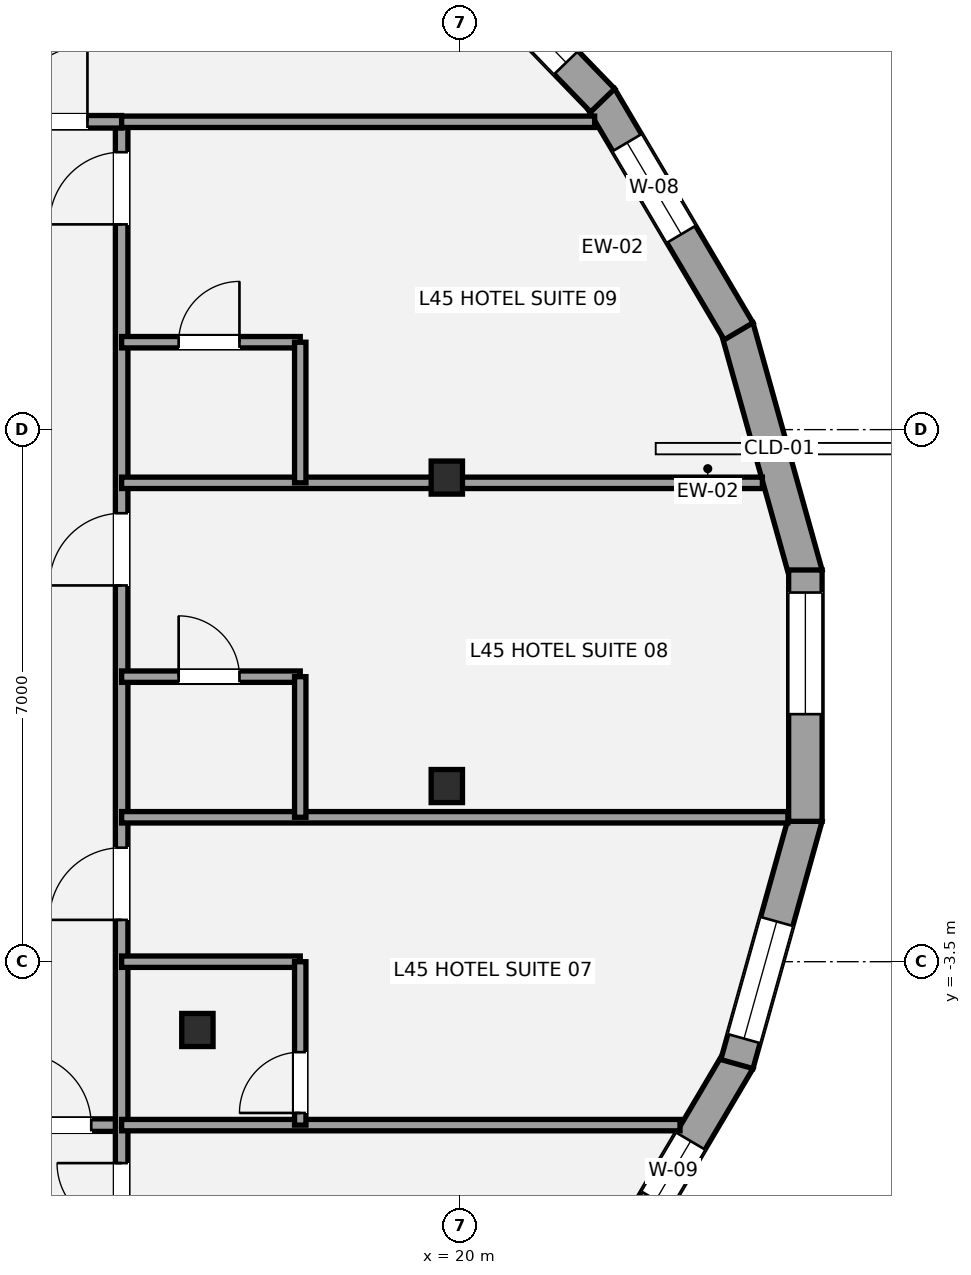
"""IFC4 building model, lengths in metres.
Left out: names, types, materials, properties, quantities, classifications, styles, units other than length and angle.
Written with IfcOpenShell. Run it as: python <this file> out.ifc"""

import sys

from ifc_helpers import new_model, si_unit, direction, frame, frame_2d, origin, origin_2d, place, context, subcontext, project, spatial, rectangle, i_section, extrude, element, fill, save


model = new_model("IFC4")
c1 = context("Model", 3, precision=1e-05, world=origin(), true_north=direction((0.0, 1.0)))
c2 = subcontext(c1, "Body", "Model", "MODEL_VIEW")
j1 = project(units=[si_unit("LENGTHUNIT", "METRE"), si_unit("PLANEANGLEUNIT", "RADIAN")], contexts=[c1])
p1 = place(None, origin())
s1 = spatial("IfcSite", under=j1, at=p1, CompositionType="ELEMENT")
p2 = place(p1, origin())
s2 = spatial("IfcBuilding", under=s1, at=p2, CompositionType="ELEMENT")
p3 = place(p2, frame((0.0, 0.0, 166.2)))
s3 = spatial("IfcBuildingStorey", under=s2, at=p3, CompositionType="ELEMENT", Elevation=166.2)
for number, where, z_axis, x_axis in (
    (1, (19.828, 2.869, 0.0), (0.0, 0.0, 1.0), (1.0, 0.0, 0.0)),
    (2, (16.547, -4.398, 0.0), (0.0, 0.0, 1.0), (1.0, 0.0, 0.0)),
    (3, (19.828, -1.189, 0.0), (0.0, 0.0, 1.0), (1.0, 0.0, 0.0)),
):
    element("IfcColumn", number, at=place(p3, frame(where, z_axis=z_axis, x_axis=x_axis)), inside=s3, PredefinedType="COLUMN", context=c2, shape_type="SweptSolid", body=[
        extrude(i_section(OverallWidth=0.412, OverallDepth=0.435, WebThickness=0.036, FlangeThickness=0.057, at=origin_2d()), origin(), (0.0, 0.0, 1.0), 3.2),
    ])
p4 = place(p3, frame((23.645, 4.846, 0.0), z_axis=(0.0, 0.0, 1.0), x_axis=(0.269235699479, -0.963074315993, 0.0)))
e4 = element("IfcWall", 4, at=p4, inside=s3, PredefinedType="STANDARD", context=c2, shape_type="SweptSolid", body=[
    extrude(rectangle(XDim=3.377, YDim=0.44, at=frame_2d((1.688, 0.0))), origin(), (0.0, 0.0, 1.0), 2.315),
])
p5 = place(p3, frame((21.847, 7.873, 0.0), z_axis=(0.0, 0.0, 1.0), x_axis=(0.508883387051, -0.860835465338, 0.0)))
e5 = element("IfcWall", 5, at=p5, inside=s3, PredefinedType="STANDARD", context=c2, shape_type="SweptSolid", body=[
    extrude(rectangle(XDim=3.577, YDim=0.44, at=frame_2d((1.788, 0.0))), origin(), (0.0, 0.0, 1.0), 2.315),
])
p6 = place(p5, frame((0.694, 0.0, 0.58)))
e6 = element("IfcOpeningElement", 6, at=p6, cuts=e5, PredefinedType="OPENING", context=c2, shape_type="SweptSolid", body=[
    extrude(rectangle(XDim=1.4, YDim=1.55, at=frame_2d((0.7, 0.775))), frame((0.0, 0.23, 0.0), z_axis=(0.0, -1.0, 0.0), x_axis=(1.0, 0.0, 0.0)), (0.0, 0.0, 1.0), 0.46),
])
p7 = place(p3, frame((19.192, 10.612, 0.0), z_axis=(0.0, 0.0, 1.0), x_axis=(0.694975307772, -0.719033602544, 0.0)))
e7 = element("IfcWall", 7, at=p7, inside=s3, PredefinedType="STANDARD", context=c2, shape_type="SweptSolid", body=[
    extrude(rectangle(XDim=3.866, YDim=0.44, at=frame_2d((1.933, 0.0))), origin(), (0.0, 0.0, 1.0), 2.315),
])
p8 = place(p7, frame((1.575, 0.0, 0.58)))
e8 = element("IfcOpeningElement", 8, at=p8, cuts=e7, PredefinedType="OPENING", context=c2, shape_type="SweptSolid", body=[
    extrude(rectangle(XDim=1.6, YDim=1.55, at=frame_2d((0.8, 0.775))), frame((0.0, 0.23, 0.0), z_axis=(0.0, -1.0, 0.0), x_axis=(1.0, 0.0, 0.0)), (0.0, 0.0, 1.0), 0.46),
])
p9 = place(p3, frame((23.667, -4.794, 0.0), z_axis=(0.0, 0.0, 1.0), x_axis=(-0.508883387051, -0.860835465338, 0.0)))
e9 = element("IfcWall", 9, at=p9, inside=s3, PredefinedType="STANDARD", context=c2, shape_type="SweptSolid", body=[
    extrude(rectangle(XDim=3.577, YDim=0.44, at=frame_2d((1.788, 0.0))), origin(), (0.0, 0.0, 1.0), 2.315),
])
p10 = place(p9, frame((1.239, 0.0, 0.58)))
e10 = element("IfcOpeningElement", 10, at=p10, cuts=e9, PredefinedType="OPENING", context=c2, shape_type="SweptSolid", body=[
    extrude(rectangle(XDim=0.9, YDim=1.35, at=frame_2d((0.45, 0.675))), frame((0.0, 0.23, 0.0), z_axis=(0.0, -1.0, 0.0), x_axis=(1.0, 0.0, 0.0)), (0.0, 0.0, 1.0), 0.46),
])
p11 = place(p3, frame((24.554, -1.594, 0.0), z_axis=(0.0, 0.0, 1.0), x_axis=(-0.269235699479, -0.963074315993, 0.0)))
e11 = element("IfcWall", 11, at=p11, inside=s3, PredefinedType="STANDARD", context=c2, shape_type="SweptSolid", body=[
    extrude(rectangle(XDim=3.377, YDim=0.44, at=frame_2d((1.688, 0.0))), origin(), (0.0, 0.0, 1.0), 2.315),
])
p12 = place(p11, frame((1.429, 0.0, 0.58)))
e12 = element("IfcOpeningElement", 12, at=p12, cuts=e11, PredefinedType="OPENING", context=c2, shape_type="SweptSolid", body=[
    extrude(rectangle(XDim=1.6, YDim=1.55, at=frame_2d((0.8, 0.775))), frame((0.0, 0.23, 0.0), z_axis=(0.0, -1.0, 0.0), x_axis=(1.0, 0.0, 0.0)), (0.0, 0.0, 1.0), 0.46),
])
p13 = place(p3, frame((24.546, 1.654, 0.0), z_axis=(0.0, 0.0, 1.0), x_axis=(0.0, -1.0, 0.0)))
e13 = element("IfcWall", 13, at=p13, inside=s3, PredefinedType="STANDARD", context=c2, shape_type="SweptSolid", body=[
    extrude(rectangle(XDim=3.307, YDim=0.44, at=frame_2d((1.654, 0.0))), origin(), (0.0, 0.0, 1.0), 2.315),
])
p14 = place(p13, frame((0.297, 0.0, 0.58)))
e14 = element("IfcOpeningElement", 14, at=p14, cuts=e13, PredefinedType="OPENING", context=c2, shape_type="SweptSolid", body=[
    extrude(rectangle(XDim=1.6, YDim=1.55, at=frame_2d((0.8, 0.775))), frame((0.0, 0.23, 0.0), z_axis=(0.0, -1.0, 0.0), x_axis=(1.0, 0.0, 0.0)), (0.0, 0.0, 1.0), 0.46),
])
p15 = place(p3, frame((-15.95, -5.65, 0.0), z_axis=(0.0, 0.0, 1.0), x_axis=(1.0, 0.0, 0.0)))
e15 = element("IfcWall", 15, at=p15, inside=s3, PredefinedType="PARTITIONING", context=c2, shape_type="SweptSolid", body=[
    extrude(rectangle(XDim=31.5, YDim=0.165, at=frame_2d((15.75, 0.0))), origin(), (0.0, 0.0, 1.0), 2.398),
])
p16 = place(p15, frame((4.8, 0.0, 0.0)))
e16 = element("IfcOpeningElement", 16, at=p16, cuts=e15, PredefinedType="OPENING", context=c2, shape_type="SweptSolid", body=[
    extrude(rectangle(XDim=0.95, YDim=2.15, at=frame_2d((0.475, 1.075))), frame((0.0, 0.093, 0.0), z_axis=(0.0, -1.0, 0.0), x_axis=(1.0, 0.0, 0.0)), (0.0, 0.0, 1.0), 0.185),
])
p17 = place(p15, frame((12.8, 0.0, 0.0)))
e17 = element("IfcOpeningElement", 17, at=p17, cuts=e15, PredefinedType="OPENING", context=c2, shape_type="SweptSolid", body=[
    extrude(rectangle(XDim=0.95, YDim=2.15, at=frame_2d((0.475, 1.075))), frame((0.0, 0.093, 0.0), z_axis=(0.0, -1.0, 0.0), x_axis=(1.0, 0.0, 0.0)), (0.0, 0.0, 1.0), 0.185),
])
p18 = place(p15, frame((20.8, 0.0, 0.0)))
e18 = element("IfcOpeningElement", 18, at=p18, cuts=e15, PredefinedType="OPENING", context=c2, shape_type="SweptSolid", body=[
    extrude(rectangle(XDim=0.95, YDim=2.15, at=frame_2d((0.475, 1.075))), frame((0.0, 0.093, 0.0), z_axis=(0.0, -1.0, 0.0), x_axis=(1.0, 0.0, 0.0)), (0.0, 0.0, 1.0), 0.185),
])
p19 = place(p15, frame((30.15, 0.0, 0.0)))
e19 = element("IfcOpeningElement", 19, at=p19, cuts=e15, PredefinedType="OPENING", context=c2, shape_type="SweptSolid", body=[
    extrude(rectangle(XDim=0.95, YDim=2.15, at=frame_2d((0.475, 1.075))), frame((0.0, 0.093, 0.0), z_axis=(0.0, -1.0, 0.0), x_axis=(1.0, 0.0, 0.0)), (0.0, 0.0, 1.0), 0.185),
])
p20 = place(p3, frame((15.55, -12.773, 0.0), z_axis=(0.0, 0.0, 1.0), x_axis=(0.0, 1.0, 0.0)))
e20 = element("IfcWall", 20, at=p20, inside=s3, PredefinedType="PARTITIONING", context=c2, shape_type="SweptSolid", body=[
    extrude(rectangle(XDim=20.323, YDim=0.165, at=frame_2d((10.162, 0.0))), origin(), (0.0, 0.0, 1.0), 2.473),
])
p21 = place(p20, frame((5.773, 0.0, 0.0)))
e21 = element("IfcOpeningElement", 21, at=p21, cuts=e20, PredefinedType="OPENING", context=c2, shape_type="SweptSolid", body=[
    extrude(rectangle(XDim=0.85, YDim=2.1, at=frame_2d((0.425, 1.05))), frame((0.0, 0.093, 0.0), z_axis=(0.0, -1.0, 0.0), x_axis=(1.0, 0.0, 0.0)), (0.0, 0.0, 1.0), 0.185),
])
p22 = place(p20, frame((9.823, 0.0, 0.0)))
e22 = element("IfcOpeningElement", 22, at=p22, cuts=e20, PredefinedType="OPENING", context=c2, shape_type="SweptSolid", body=[
    extrude(rectangle(XDim=0.95, YDim=2.15, at=frame_2d((0.475, 1.075))), frame((0.0, 0.093, 0.0), z_axis=(0.0, -1.0, 0.0), x_axis=(1.0, 0.0, 0.0)), (0.0, 0.0, 1.0), 0.185),
])
p23 = place(p20, frame((14.223, 0.0, 0.0)))
e23 = element("IfcOpeningElement", 23, at=p23, cuts=e20, PredefinedType="OPENING", context=c2, shape_type="SweptSolid", body=[
    extrude(rectangle(XDim=0.95, YDim=2.15, at=frame_2d((0.475, 1.075))), frame((0.0, 0.093, 0.0), z_axis=(0.0, -1.0, 0.0), x_axis=(1.0, 0.0, 0.0)), (0.0, 0.0, 1.0), 0.185),
])
p24 = place(p20, frame((18.973, 0.0, 0.0)))
e24 = element("IfcOpeningElement", 24, at=p24, cuts=e20, PredefinedType="OPENING", context=c2, shape_type="SweptSolid", body=[
    extrude(rectangle(XDim=0.95, YDim=2.15, at=frame_2d((0.475, 1.075))), frame((0.0, 0.093, 0.0), z_axis=(0.0, -1.0, 0.0), x_axis=(1.0, 0.0, 0.0)), (0.0, 0.0, 1.0), 0.185),
])
p25 = place(p3, frame((13.8, 7.55, 0.0), z_axis=(0.0, 0.0, 1.0), x_axis=(1.0, 0.0, 0.0)))
e25 = element("IfcWall", 25, at=p25, inside=s3, PredefinedType="PARTITIONING", context=c2, shape_type="SweptSolid", body=[
    extrude(rectangle(XDim=1.75, YDim=0.165, at=frame_2d((0.875, 0.0))), origin(), (0.0, 0.0, 1.0), 2.473),
])
p26 = place(p25, frame((0.3, 0.0, 0.0)))
e26 = element("IfcOpeningElement", 26, at=p26, cuts=e25, PredefinedType="OPENING", context=c2, shape_type="SweptSolid", body=[
    extrude(rectangle(XDim=1.0, YDim=2.15, at=frame_2d((0.5, 1.075))), frame((0.0, 0.093, 0.0), z_axis=(0.0, -1.0, 0.0), x_axis=(1.0, 0.0, 0.0)), (0.0, 0.0, 1.0), 0.185),
])
p27 = place(p3, frame((15.55, 7.55, 0.0), z_axis=(0.0, 0.0, 1.0), x_axis=(1.0, 0.0, 0.0)))
e27 = element("IfcWall", 27, at=p27, inside=s3, PredefinedType="PLUMBINGWALL", context=c2, shape_type="SweptSolid", body=[
    extrude(rectangle(XDim=6.223, YDim=0.15, at=frame_2d((3.112, 0.0))), origin(), (0.0, 0.0, 1.0), 2.473),
])
p28 = place(p3, frame((15.55, -5.65, 0.0), z_axis=(0.0, 0.0, 1.0), x_axis=(1.0, 0.0, 0.0)))
e28 = element("IfcWall", 28, at=p28, inside=s3, PredefinedType="PLUMBINGWALL", context=c2, shape_type="SweptSolid", body=[
    extrude(rectangle(XDim=7.346, YDim=0.15, at=frame_2d((3.673, 0.0))), origin(), (0.0, 0.0, 1.0), 2.473),
])
p29 = place(p3, frame((15.55, -1.6, 0.0), z_axis=(0.0, 0.0, 1.0), x_axis=(1.0, 0.0, 0.0)))
e29 = element("IfcWall", 29, at=p29, inside=s3, PredefinedType="PLUMBINGWALL", context=c2, shape_type="SweptSolid", body=[
    extrude(rectangle(XDim=8.766, YDim=0.15, at=frame_2d((4.383, 0.0))), origin(), (0.0, 0.0, 1.0), 2.398),
])
p30 = place(p3, frame((15.55, 2.8, 0.0), z_axis=(0.0, 0.0, 1.0), x_axis=(1.0, 0.0, 0.0)))
e30 = element("IfcWall", 30, at=p30, inside=s3, PredefinedType="PLUMBINGWALL", context=c2, shape_type="SweptSolid", body=[
    extrude(rectangle(XDim=8.43, YDim=0.15, at=frame_2d((4.215, 0.0))), origin(), (0.0, 0.0, 1.0), 2.473),
])
p31 = place(p3, frame((15.55, -3.5, 0.0), z_axis=(0.0, 0.0, 1.0), x_axis=(1.0, 0.0, 0.0)))
e31 = element("IfcWall", 31, at=p31, inside=s3, PredefinedType="PLUMBINGWALL", context=c2, shape_type="SweptSolid", body=[
    extrude(rectangle(XDim=2.35, YDim=0.15, at=frame_2d((1.175, 0.0))), origin(), (0.0, 0.0, 1.0), 2.398),
])
p32 = place(p3, frame((17.9, -5.65, 0.0), z_axis=(0.0, 0.0, 1.0), x_axis=(0.0, 1.0, 0.0)))
e32 = element("IfcWall", 32, at=p32, inside=s3, PredefinedType="PLUMBINGWALL", context=c2, shape_type="SweptSolid", body=[
    extrude(rectangle(XDim=2.15, YDim=0.15, at=frame_2d((1.075, 0.0))), origin(), (0.0, 0.0, 1.0), 3.02),
])
p33 = place(p32, frame((0.16, 0.0, 0.0)))
e33 = element("IfcOpeningElement", 33, at=p33, cuts=e32, PredefinedType="OPENING", context=c2, shape_type="SweptSolid", body=[
    extrude(rectangle(XDim=0.8, YDim=2.1, at=frame_2d((0.4, 1.05))), frame((0.0, 0.085, 0.0), z_axis=(0.0, -1.0, 0.0), x_axis=(1.0, 0.0, 0.0)), (0.0, 0.0, 1.0), 0.17),
])
p34 = place(p3, frame((15.55, 0.25, 0.0), z_axis=(0.0, 0.0, 1.0), x_axis=(1.0, 0.0, 0.0)))
e34 = element("IfcWall", 34, at=p34, inside=s3, PredefinedType="PLUMBINGWALL", context=c2, shape_type="SweptSolid", body=[
    extrude(rectangle(XDim=2.35, YDim=0.15, at=frame_2d((1.175, 0.0))), origin(), (0.0, 0.0, 1.0), 2.473),
])
p35 = place(p34, frame((0.75, 0.0, 0.0)))
e35 = element("IfcOpeningElement", 35, at=p35, cuts=e34, PredefinedType="OPENING", context=c2, shape_type="SweptSolid", body=[
    extrude(rectangle(XDim=0.8, YDim=2.1, at=frame_2d((0.4, 1.05))), frame((0.0, 0.085, 0.0), z_axis=(0.0, -1.0, 0.0), x_axis=(1.0, 0.0, 0.0)), (0.0, 0.0, 1.0), 0.17),
])
p36 = place(p3, frame((17.9, -1.6, 0.0), z_axis=(0.0, 0.0, 1.0), x_axis=(0.0, 1.0, 0.0)))
e36 = element("IfcWall", 36, at=p36, inside=s3, PredefinedType="PLUMBINGWALL", context=c2, shape_type="SweptSolid", body=[
    extrude(rectangle(XDim=1.85, YDim=0.15, at=frame_2d((0.925, 0.0))), origin(), (0.0, 0.0, 1.0), 3.02),
])
p37 = place(p3, frame((15.55, 4.65, 0.0), z_axis=(0.0, 0.0, 1.0), x_axis=(1.0, 0.0, 0.0)))
e37 = element("IfcWall", 37, at=p37, inside=s3, PredefinedType="PLUMBINGWALL", context=c2, shape_type="SweptSolid", body=[
    extrude(rectangle(XDim=2.35, YDim=0.15, at=frame_2d((1.175, 0.0))), origin(), (0.0, 0.0, 1.0), 2.473),
])
p38 = place(p37, frame((0.75, 0.0, 0.0)))
e38 = element("IfcOpeningElement", 38, at=p38, cuts=e37, PredefinedType="OPENING", context=c2, shape_type="SweptSolid", body=[
    extrude(rectangle(XDim=0.8, YDim=2.1, at=frame_2d((0.4, 1.05))), frame((0.0, 0.085, 0.0), z_axis=(0.0, -1.0, 0.0), x_axis=(1.0, 0.0, 0.0)), (0.0, 0.0, 1.0), 0.17),
])
p39 = place(p3, frame((17.9, 2.8, 0.0), z_axis=(0.0, 0.0, 1.0), x_axis=(0.0, 1.0, 0.0)))
e39 = element("IfcWall", 39, at=p39, inside=s3, PredefinedType="PLUMBINGWALL", context=c2, shape_type="SweptSolid", body=[
    extrude(rectangle(XDim=1.85, YDim=0.15, at=frame_2d((0.925, 0.0))), origin(), (0.0, 0.0, 1.0), 2.473),
])
p40 = place(p6, origin())
e40 = element("IfcWindow", 40, at=p40, inside=s3, PartitioningType="SINGLE_PANEL", PredefinedType="WINDOW", context=c2, shape_type="SweptSolid", body=[
    extrude(rectangle(XDim=1.4, YDim=1.55, at=frame_2d((0.7, 0.775))), frame((0.0, -0.01, 0.0), z_axis=(0.0, -1.0, 0.0), x_axis=(1.0, 0.0, 0.0)), (0.0, 0.0, 1.0), 0.06),
])
fill(e6, e40)
p41 = place(p8, origin())
e41 = element("IfcWindow", 41, at=p41, inside=s3, PartitioningType="SINGLE_PANEL", PredefinedType="WINDOW", context=c2, shape_type="SweptSolid", body=[
    extrude(rectangle(XDim=1.6, YDim=1.55, at=frame_2d((0.8, 0.775))), frame((0.0, -0.01, 0.0), z_axis=(0.0, -1.0, 0.0), x_axis=(1.0, 0.0, 0.0)), (0.0, 0.0, 1.0), 0.06),
])
fill(e8, e41)
p42 = place(p10, origin())
e42 = element("IfcWindow", 42, at=p42, inside=s3, PartitioningType="SINGLE_PANEL", PredefinedType="WINDOW", context=c2, shape_type="SweptSolid", body=[
    extrude(rectangle(XDim=0.9, YDim=1.35, at=frame_2d((0.45, 0.675))), frame((0.0, -0.01, 0.0), z_axis=(0.0, -1.0, 0.0), x_axis=(1.0, 0.0, 0.0)), (0.0, 0.0, 1.0), 0.06),
])
fill(e10, e42)
p43 = place(p12, origin())
e43 = element("IfcWindow", 43, at=p43, inside=s3, PartitioningType="SINGLE_PANEL", PredefinedType="WINDOW", context=c2, shape_type="SweptSolid", body=[
    extrude(rectangle(XDim=1.6, YDim=1.55, at=frame_2d((0.8, 0.775))), frame((0.0, -0.01, 0.0), z_axis=(0.0, -1.0, 0.0), x_axis=(1.0, 0.0, 0.0)), (0.0, 0.0, 1.0), 0.06),
])
fill(e12, e43)
p44 = place(p14, origin())
e44 = element("IfcWindow", 44, at=p44, inside=s3, PartitioningType="SINGLE_PANEL", PredefinedType="WINDOW", context=c2, shape_type="SweptSolid", body=[
    extrude(rectangle(XDim=1.6, YDim=1.55, at=frame_2d((0.8, 0.775))), frame((0.0, -0.01, 0.0), z_axis=(0.0, -1.0, 0.0), x_axis=(1.0, 0.0, 0.0)), (0.0, 0.0, 1.0), 0.06),
])
fill(e14, e44)
p45 = place(p26, origin())
e45 = element("IfcDoor", 45, at=p45, inside=s3, OperationType="SINGLE_SWING_RIGHT", PredefinedType="DOOR", context=c2, shape_type="SweptSolid", body=[
    extrude(rectangle(XDim=1.0, YDim=2.15, at=frame_2d((0.5, 1.075))), frame((0.0, 0.025, 0.0), z_axis=(0.0, -1.0, 0.0), x_axis=(1.0, 0.0, 0.0)), (0.0, 0.0, 1.0), 0.05),
])
fill(e26, e45)
p46 = place(p21, origin())
e46 = element("IfcDoor", 46, at=p46, inside=s3, OperationType="SINGLE_SWING_RIGHT", PredefinedType="DOOR", context=c2, shape_type="SweptSolid", body=[
    extrude(rectangle(XDim=0.85, YDim=2.1, at=frame_2d((0.425, 1.05))), frame((0.0, 0.025, 0.0), z_axis=(0.0, -1.0, 0.0), x_axis=(1.0, 0.0, 0.0)), (0.0, 0.0, 1.0), 0.05),
])
fill(e21, e46)
p47 = place(p19, origin())
e47 = element("IfcDoor", 47, at=p47, inside=s3, OperationType="SINGLE_SWING_LEFT", PredefinedType="DOOR", context=c2, shape_type="SweptSolid", body=[
    extrude(rectangle(XDim=0.95, YDim=2.15, at=frame_2d((0.475, 1.075))), frame((0.0, 0.025, 0.0), z_axis=(0.0, -1.0, 0.0), x_axis=(1.0, 0.0, 0.0)), (0.0, 0.0, 1.0), 0.05),
])
fill(e19, e47)
p48 = place(p22, origin())
e48 = element("IfcDoor", 48, at=p48, inside=s3, OperationType="SINGLE_SWING_LEFT", PredefinedType="DOOR", context=c2, shape_type="SweptSolid", body=[
    extrude(rectangle(XDim=0.95, YDim=2.15, at=frame_2d((0.475, 1.075))), frame((0.0, 0.025, 0.0), z_axis=(0.0, -1.0, 0.0), x_axis=(1.0, 0.0, 0.0)), (0.0, 0.0, 1.0), 0.05),
])
fill(e22, e48)
p49 = place(p33, origin())
e49 = element("IfcDoor", 49, at=p49, inside=s3, OperationType="SINGLE_SWING_LEFT", PredefinedType="DOOR", context=c2, shape_type="SweptSolid", body=[
    extrude(rectangle(XDim=0.8, YDim=2.1, at=frame_2d((0.4, 1.05))), frame((0.0, 0.025, 0.0), z_axis=(0.0, -1.0, 0.0), x_axis=(1.0, 0.0, 0.0)), (0.0, 0.0, 1.0), 0.05),
])
fill(e33, e49)
p50 = place(p23, origin())
e50 = element("IfcDoor", 50, at=p50, inside=s3, OperationType="SINGLE_SWING_LEFT", PredefinedType="DOOR", context=c2, shape_type="SweptSolid", body=[
    extrude(rectangle(XDim=0.95, YDim=2.15, at=frame_2d((0.475, 1.075))), frame((0.0, 0.025, 0.0), z_axis=(0.0, -1.0, 0.0), x_axis=(1.0, 0.0, 0.0)), (0.0, 0.0, 1.0), 0.05),
])
fill(e23, e50)
p51 = place(p35, origin())
e51 = element("IfcDoor", 51, at=p51, inside=s3, OperationType="SINGLE_SWING_LEFT", PredefinedType="DOOR", context=c2, shape_type="SweptSolid", body=[
    extrude(rectangle(XDim=0.8, YDim=2.1, at=frame_2d((0.4, 1.05))), frame((0.0, 0.025, 0.0), z_axis=(0.0, -1.0, 0.0), x_axis=(1.0, 0.0, 0.0)), (0.0, 0.0, 1.0), 0.05),
])
fill(e35, e51)
p52 = place(p24, origin())
e52 = element("IfcDoor", 52, at=p52, inside=s3, OperationType="SINGLE_SWING_LEFT", PredefinedType="DOOR", context=c2, shape_type="SweptSolid", body=[
    extrude(rectangle(XDim=0.95, YDim=2.15, at=frame_2d((0.475, 1.075))), frame((0.0, 0.025, 0.0), z_axis=(0.0, -1.0, 0.0), x_axis=(1.0, 0.0, 0.0)), (0.0, 0.0, 1.0), 0.05),
])
fill(e24, e52)
p53 = place(p38, origin())
e53 = element("IfcDoor", 53, at=p53, inside=s3, OperationType="SINGLE_SWING_RIGHT", PredefinedType="DOOR", context=c2, shape_type="SweptSolid", body=[
    extrude(rectangle(XDim=0.8, YDim=2.1, at=frame_2d((0.4, 1.05))), frame((0.0, 0.025, 0.0), z_axis=(0.0, -1.0, 0.0), x_axis=(1.0, 0.0, 0.0)), (0.0, 0.0, 1.0), 0.05),
])
fill(e38, e53)
save(model, sys.argv[1])
